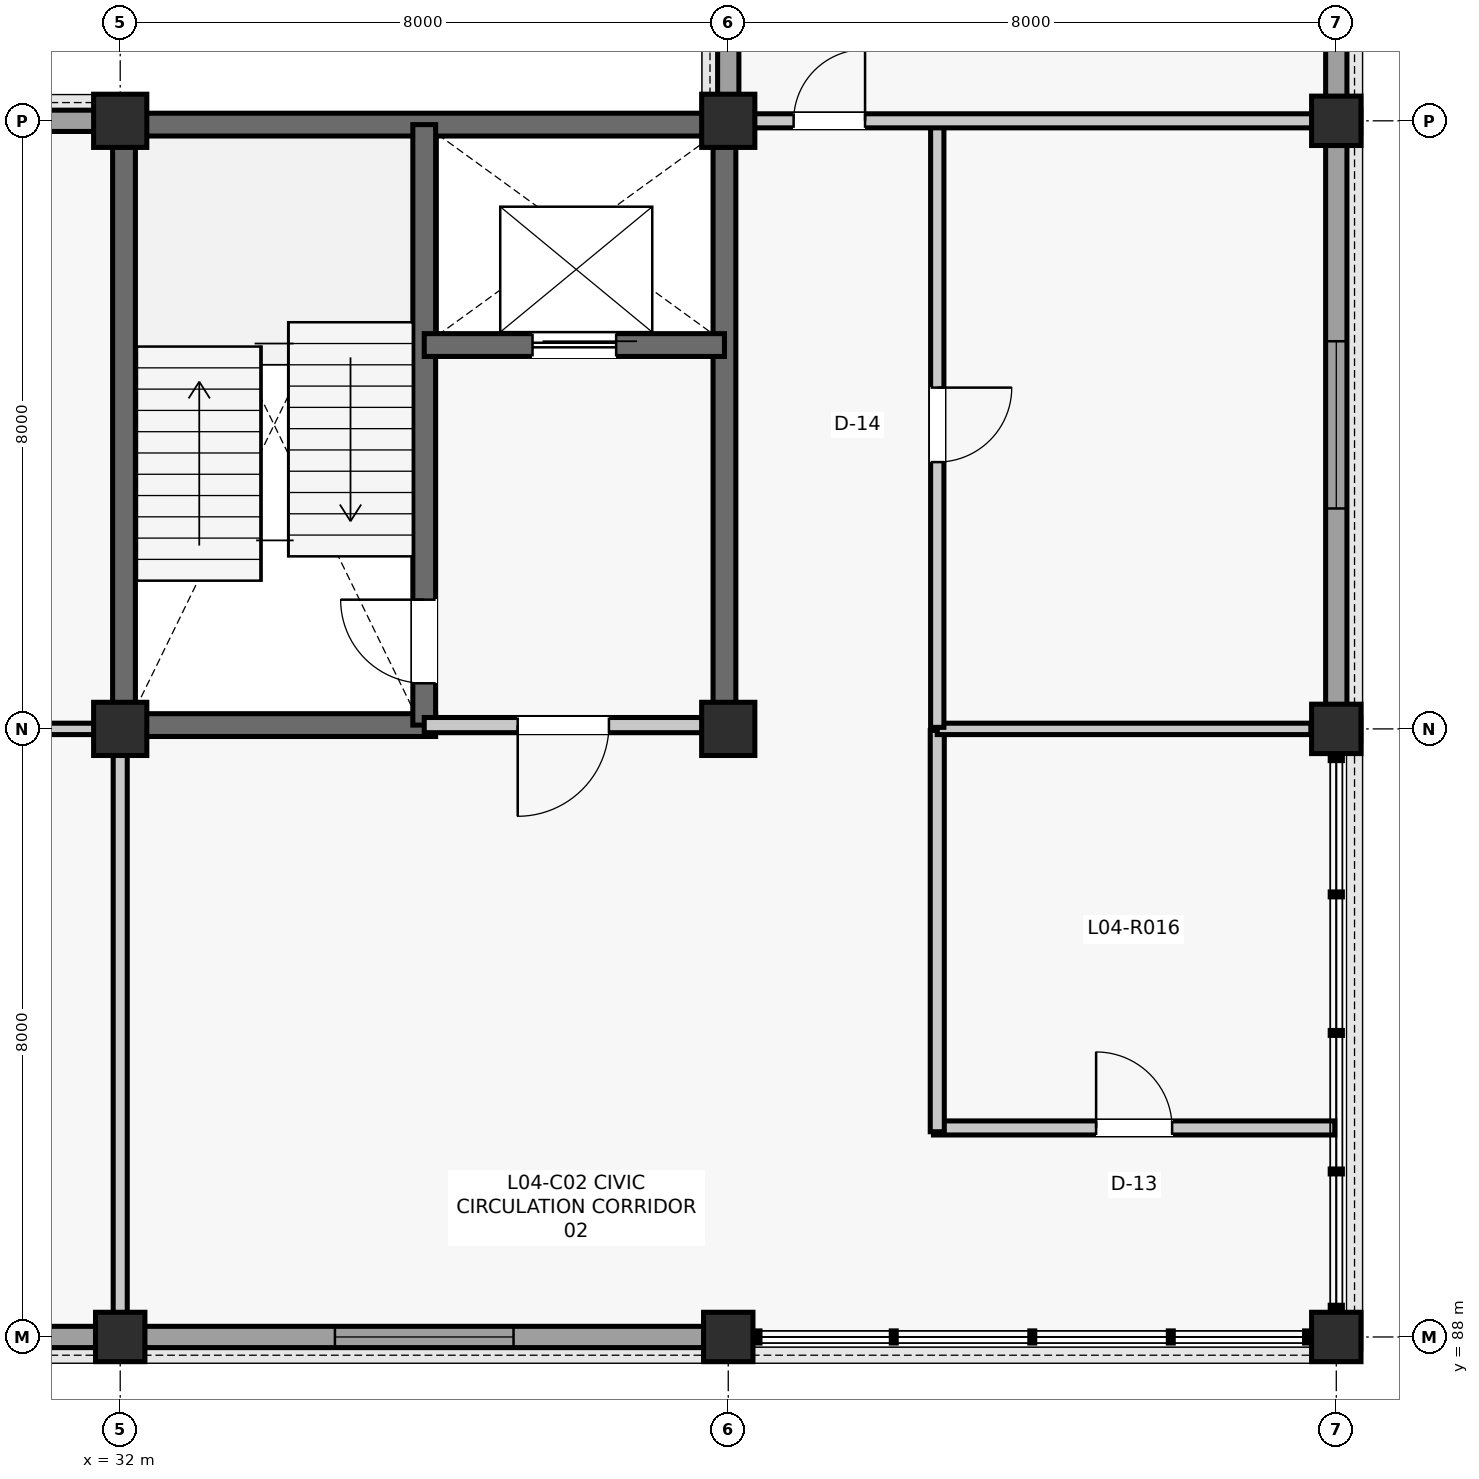
"""IFC4 building model, lengths in metres.
Left out: names, types, materials, properties, quantities, classifications, styles, units other than length and angle.
Written with IfcOpenShell. Run it as: python <this file> out.ifc"""

import sys

from ifc_helpers import new_model, si_unit, direction, frame, frame_2d, origin, origin_2d, place, context, subcontext, project, spatial, rectangle, extrude, element, fill, save


model = new_model("IFC4")
c1 = context("Model", 3, precision=1e-05, world=origin(), true_north=direction((0.0, 1.0)))
c2 = subcontext(c1, "Body", "Model", "MODEL_VIEW")
j1 = project(units=[si_unit("LENGTHUNIT", "METRE"), si_unit("PLANEANGLEUNIT", "RADIAN")], contexts=[c1])
p1 = place(None, origin())
s1 = spatial("IfcSite", under=j1, at=p1, CompositionType="ELEMENT")
p2 = place(p1, origin())
s2 = spatial("IfcBuilding", under=s1, at=p2, CompositionType="ELEMENT")
p3 = place(p2, frame((0.0, 0.0, 17.82)))
s3 = spatial("IfcBuildingStorey", under=s2, at=p3, CompositionType="ELEMENT", Elevation=17.82)
p4 = place(p3, frame((32.0, 88.0, 0.0), z_axis=(0.0, 0.0, 1.0), x_axis=(1.0, 0.0, 0.0)))
e1 = element("IfcColumn", 1, at=p4, inside=s3, PredefinedType="COLUMN", context=c2, shape_type="SweptSolid", body=[
    extrude(rectangle(XDim=0.65, YDim=0.65, at=origin_2d()), origin(), (0.0, 0.0, 1.0), 3.96),
])
for number, where, z_axis, x_axis in (
    (2, (32.0, 96.0, 0.0), (0.0, 0.0, 1.0), (1.0, 0.0, 0.0)),
    (3, (32.0, 104.0, 0.0), (0.0, 0.0, 1.0), (1.0, 0.0, 0.0)),
):
    element("IfcColumn", number, at=place(p3, frame(where, z_axis=z_axis, x_axis=x_axis)), inside=s3, PredefinedType="COLUMN", context=c2, shape_type="SweptSolid", body=[
        extrude(rectangle(XDim=0.7, YDim=0.7, at=origin_2d()), origin(), (0.0, 0.0, 1.0), 3.96),
    ])
p5 = place(p3, frame((40.0, 88.0, 0.0), z_axis=(0.0, 0.0, 1.0), x_axis=(1.0, 0.0, 0.0)))
e4 = element("IfcColumn", 4, at=p5, inside=s3, PredefinedType="COLUMN", context=c2, shape_type="SweptSolid", body=[
    extrude(rectangle(XDim=0.65, YDim=0.65, at=origin_2d()), origin(), (0.0, 0.0, 1.0), 3.96),
])
for number, where, z_axis, x_axis in (
    (5, (40.0, 96.0, 0.0), (0.0, 0.0, 1.0), (1.0, 0.0, 0.0)),
    (6, (40.0, 104.0, 0.0), (0.0, 0.0, 1.0), (1.0, 0.0, 0.0)),
):
    element("IfcColumn", number, at=place(p3, frame(where, z_axis=z_axis, x_axis=x_axis)), inside=s3, PredefinedType="COLUMN", context=c2, shape_type="SweptSolid", body=[
        extrude(rectangle(XDim=0.7, YDim=0.7, at=origin_2d()), origin(), (0.0, 0.0, 1.0), 3.96),
    ])
for number, where, z_axis, x_axis in (
    (7, (48.0, 88.0, 0.0), (0.0, 0.0, 1.0), (1.0, 0.0, 0.0)),
    (8, (48.0, 96.0, 0.0), (0.0, 0.0, 1.0), (1.0, 0.0, 0.0)),
    (9, (48.0, 104.0, 0.0), (0.0, 0.0, 1.0), (1.0, 0.0, 0.0)),
):
    element("IfcColumn", number, at=place(p3, frame(where, z_axis=z_axis, x_axis=x_axis)), inside=s3, PredefinedType="COLUMN", context=c2, shape_type="SweptSolid", body=[
        extrude(rectangle(XDim=0.65, YDim=0.65, at=origin_2d()), origin(), (0.0, 0.0, 1.0), 3.96),
    ])
p6 = place(p3, frame((24.31, 88.0, 0.0), z_axis=(0.0, 0.0, 1.0), x_axis=(1.0, 0.0, 0.0)))
e10 = element("IfcWall", 10, at=p6, inside=s3, PredefinedType="SOLIDWALL", context=c2, shape_type="SweptSolid", body=[
    extrude(rectangle(XDim=7.38, YDim=0.28, at=frame_2d((3.69, 0.0))), origin(), (0.0, 0.0, 1.0), 3.314),
])
p7 = place(p6, frame((2.865, 0.0, 0.9)))
e11 = element("IfcOpeningElement", 11, at=p7, cuts=e10, PredefinedType="OPENING", context=c2, shape_type="SweptSolid", body=[
    extrude(rectangle(XDim=1.65, YDim=1.75, at=frame_2d((0.825, 0.875))), frame((0.0, 0.15, 0.0), z_axis=(0.0, -1.0, 0.0), x_axis=(1.0, 0.0, 0.0)), (0.0, 0.0, 1.0), 0.3),
])
p8 = place(p3, frame((24.31, 104.0, 0.0), z_axis=(0.0, 0.0, 1.0), x_axis=(1.0, 0.0, 0.0)))
e12 = element("IfcWall", 12, at=p8, inside=s3, PredefinedType="SOLIDWALL", context=c2, shape_type="SweptSolid", body=[
    extrude(rectangle(XDim=7.355, YDim=0.28, at=frame_2d((3.677, 0.0))), origin(), (0.0, 0.0, 1.0), 3.31),
])
p9 = place(p8, frame((2.502, 0.0, 0.9)))
e13 = element("IfcOpeningElement", 13, at=p9, cuts=e12, PredefinedType="OPENING", context=c2, shape_type="SweptSolid", body=[
    extrude(rectangle(XDim=2.35, YDim=1.7, at=frame_2d((1.175, 0.85))), frame((0.0, 0.15, 0.0), z_axis=(0.0, -1.0, 0.0), x_axis=(1.0, 0.0, 0.0)), (0.0, 0.0, 1.0), 0.3),
])
p10 = place(p3, frame((32.31, 88.0, 0.0), z_axis=(0.0, 0.0, 1.0), x_axis=(1.0, 0.0, 0.0)))
e14 = element("IfcWall", 14, at=p10, inside=s3, PredefinedType="SOLIDWALL", context=c2, shape_type="SweptSolid", body=[
    extrude(rectangle(XDim=7.38, YDim=0.28, at=frame_2d((3.69, 0.0))), origin(), (0.0, 0.0, 1.0), 3.377),
])
p11 = place(p10, frame((2.515, 0.0, 0.9)))
e15 = element("IfcOpeningElement", 15, at=p11, cuts=e14, PredefinedType="OPENING", context=c2, shape_type="SweptSolid", body=[
    extrude(rectangle(XDim=2.35, YDim=1.7, at=frame_2d((1.175, 0.85))), frame((0.0, 0.15, 0.0), z_axis=(0.0, -1.0, 0.0), x_axis=(1.0, 0.0, 0.0)), (0.0, 0.0, 1.0), 0.3),
])
p12 = place(p3, frame((48.0, 96.31, 0.0), z_axis=(0.0, 0.0, 1.0), x_axis=(0.0, 1.0, 0.0)))
e16 = element("IfcWall", 16, at=p12, inside=s3, PredefinedType="SOLIDWALL", context=c2, shape_type="SweptSolid", body=[
    extrude(rectangle(XDim=7.38, YDim=0.28, at=frame_2d((3.69, 0.0))), origin(), (0.0, 0.0, 1.0), 3.314),
])
p13 = place(p12, frame((2.59, 0.0, 0.9)))
e17 = element("IfcOpeningElement", 17, at=p13, cuts=e16, PredefinedType="OPENING", context=c2, shape_type="SweptSolid", body=[
    extrude(rectangle(XDim=2.2, YDim=2.0, at=frame_2d((1.1, 1.0))), frame((0.0, 0.15, 0.0), z_axis=(0.0, -1.0, 0.0), x_axis=(1.0, 0.0, 0.0)), (0.0, 0.0, 1.0), 0.3),
])
p14 = place(p3, frame((40.0, 104.335, 0.0), z_axis=(0.0, 0.0, 1.0), x_axis=(0.0, 1.0, 0.0)))
e18 = element("IfcWall", 18, at=p14, inside=s3, PredefinedType="SOLIDWALL", context=c2, shape_type="SweptSolid", body=[
    extrude(rectangle(XDim=7.355, YDim=0.28, at=frame_2d((3.677, 0.0))), origin(), (0.0, 0.0, 1.0), 3.314),
])
p15 = place(p14, frame((2.853, 0.0, 0.9)))
e19 = element("IfcOpeningElement", 19, at=p15, cuts=e18, PredefinedType="OPENING", context=c2, shape_type="SweptSolid", body=[
    extrude(rectangle(XDim=1.65, YDim=1.75, at=frame_2d((0.825, 0.875))), frame((0.0, 0.15, 0.0), z_axis=(0.0, -1.0, 0.0), x_axis=(1.0, 0.0, 0.0)), (0.0, 0.0, 1.0), 0.3),
])
p16 = place(p3, frame((48.0, 104.31, 0.0), z_axis=(0.0, 0.0, 1.0), x_axis=(0.0, 1.0, 0.0)))
e20 = element("IfcWall", 20, at=p16, inside=s3, PredefinedType="SOLIDWALL", context=c2, shape_type="SweptSolid", body=[
    extrude(rectangle(XDim=7.38, YDim=0.28, at=frame_2d((3.69, 0.0))), origin(), (0.0, 0.0, 1.0), 3.377),
])
p17 = place(p16, frame((2.865, 0.0, 0.9)))
e21 = element("IfcOpeningElement", 21, at=p17, cuts=e20, PredefinedType="OPENING", context=c2, shape_type="SweptSolid", body=[
    extrude(rectangle(XDim=1.65, YDim=1.75, at=frame_2d((0.825, 0.875))), frame((0.0, 0.15, 0.0), z_axis=(0.0, -1.0, 0.0), x_axis=(1.0, 0.0, 0.0)), (0.0, 0.0, 1.0), 0.3),
])
p18 = place(p3, frame((32.05, 96.24, 0.0), z_axis=(0.0, 0.0, 1.0), x_axis=(0.0, 1.0, 0.0)))
e22 = element("IfcWall", 22, at=p18, inside=s3, PredefinedType="SHEAR", context=c2, shape_type="SweptSolid", body=[
    extrude(rectangle(XDim=7.52, YDim=0.3, at=frame_2d((3.76, 0.0))), origin(), (0.0, 0.0, 1.0), 3.263),
])
p19 = place(p3, frame((32.24, 103.95, 0.0), z_axis=(0.0, 0.0, 1.0), x_axis=(1.0, 0.0, 0.0)))
e23 = element("IfcWall", 23, at=p19, inside=s3, PredefinedType="SHEAR", context=c2, shape_type="SweptSolid", body=[
    extrude(rectangle(XDim=7.52, YDim=0.3, at=frame_2d((3.76, 0.0))), origin(), (0.0, 0.0, 1.0), 3.367),
])
p20 = place(p3, frame((39.95, 96.24, 0.0), z_axis=(0.0, 0.0, 1.0), x_axis=(0.0, 1.0, 0.0)))
e24 = element("IfcWall", 24, at=p20, inside=s3, PredefinedType="SHEAR", context=c2, shape_type="SweptSolid", body=[
    extrude(rectangle(XDim=7.52, YDim=0.3, at=frame_2d((3.76, 0.0))), origin(), (0.0, 0.0, 1.0), 3.462),
])
p21 = place(p3, frame((32.24, 96.05, 0.0), z_axis=(0.0, 0.0, 1.0), x_axis=(1.0, 0.0, 0.0)))
e25 = element("IfcWall", 25, at=p21, inside=s3, PredefinedType="SHEAR", context=c2, shape_type="SweptSolid", body=[
    extrude(rectangle(XDim=3.91, YDim=0.3, at=frame_2d((1.955, 0.0))), origin(), (0.0, 0.0, 1.0), 3.257),
])
p22 = place(p3, frame((36.0, 96.05, 0.0), z_axis=(0.0, 0.0, 1.0), x_axis=(0.0, 1.0, 0.0)))
e26 = element("IfcWall", 26, at=p22, inside=s3, PredefinedType="SHEAR", context=c2, shape_type="SweptSolid", body=[
    extrude(rectangle(XDim=7.9, YDim=0.3, at=frame_2d((3.95, 0.0))), origin(), (0.0, 0.0, 1.0), 3.257),
])
p23 = place(p22, frame((0.55, 0.0, 0.0)))
e27 = element("IfcOpeningElement", 27, at=p23, cuts=e26, PredefinedType="OPENING", context=c2, shape_type="SweptSolid", body=[
    extrude(rectangle(XDim=1.1, YDim=2.15, at=frame_2d((0.55, 1.075))), frame((0.0, 0.16, 0.0), z_axis=(0.0, -1.0, 0.0), x_axis=(1.0, 0.0, 0.0)), (0.0, 0.0, 1.0), 0.32),
])
p24 = place(p3, frame((36.0, 101.05, 0.0), z_axis=(0.0, 0.0, 1.0), x_axis=(1.0, 0.0, 0.0)))
e28 = element("IfcWall", 28, at=p24, inside=s3, PredefinedType="SHEAR", context=c2, shape_type="SweptSolid", body=[
    extrude(rectangle(XDim=3.95, YDim=0.3, at=frame_2d((1.975, 0.0))), origin(), (0.0, 0.0, 1.0), 3.735),
])
p25 = place(p24, frame((1.425, 0.0, 0.0)))
e29 = element("IfcOpeningElement", 29, at=p25, cuts=e28, PredefinedType="OPENING", context=c2, shape_type="SweptSolid", body=[
    extrude(rectangle(XDim=1.1, YDim=2.2, at=frame_2d((0.55, 1.1))), frame((0.0, 0.16, 0.0), z_axis=(0.0, -1.0, 0.0), x_axis=(1.0, 0.0, 0.0)), (0.0, 0.0, 1.0), 0.32),
])
p26 = place(p3, frame((36.0, 96.05, 0.0), z_axis=(0.0, 0.0, 1.0), x_axis=(1.0, 0.0, 0.0)))
e30 = element("IfcWall", 30, at=p26, inside=s3, PredefinedType="PARTITIONING", context=c2, shape_type="SweptSolid", body=[
    extrude(rectangle(XDim=3.66, YDim=0.2, at=frame_2d((1.83, 0.0))), origin(), (0.0, 0.0, 1.0), 3.257),
])
p27 = place(p26, frame((1.23, 0.0, 0.0)))
e31 = element("IfcOpeningElement", 31, at=p27, cuts=e30, PredefinedType="OPENING", context=c2, shape_type="SweptSolid", body=[
    extrude(rectangle(XDim=1.2, YDim=2.15, at=frame_2d((0.6, 1.075))), frame((0.0, 0.11, 0.0), z_axis=(0.0, -1.0, 0.0), x_axis=(1.0, 0.0, 0.0)), (0.0, 0.0, 1.0), 0.22),
])
p28 = place(p3, frame((42.7, 90.75, 0.0), z_axis=(0.0, 0.0, 1.0), x_axis=(1.0, 0.0, 0.0)))
e32 = element("IfcWall", 32, at=p28, inside=s3, PredefinedType="PARTITIONING", context=c2, shape_type="SweptSolid", body=[
    extrude(rectangle(XDim=5.28, YDim=0.185, at=frame_2d((2.64, 0.0))), origin(), (0.0, 0.0, 1.0), 3.367),
])
p29 = place(p28, frame((2.14, 0.0, 0.0)))
e33 = element("IfcOpeningElement", 33, at=p29, cuts=e32, PredefinedType="OPENING", context=c2, shape_type="SweptSolid", body=[
    extrude(rectangle(XDim=1.0, YDim=2.15, at=frame_2d((0.5, 1.075))), frame((0.0, 0.103, 0.0), z_axis=(0.0, -1.0, 0.0), x_axis=(1.0, 0.0, 0.0)), (0.0, 0.0, 1.0), 0.205),
])
p30 = place(p3, frame((42.75, 90.7, 0.0), z_axis=(0.0, 0.0, 1.0), x_axis=(0.0, 1.0, 0.0)))
e34 = element("IfcWall", 34, at=p30, inside=s3, PredefinedType="PARTITIONING", context=c2, shape_type="SweptSolid", body=[
    extrude(rectangle(XDim=5.28, YDim=0.185, at=frame_2d((2.64, 0.0))), origin(), (0.0, 0.0, 1.0), 3.263),
])
p31 = place(p3, frame((42.75, 96.0, 0.0), z_axis=(0.0, 0.0, 1.0), x_axis=(1.0, 0.0, 0.0)))
e35 = element("IfcWall", 35, at=p31, inside=s3, PredefinedType="PARTITIONING", context=c2, shape_type="SweptSolid", body=[
    extrude(rectangle(XDim=4.915, YDim=0.15, at=frame_2d((2.458, 0.0))), origin(), (0.0, 0.0, 1.0), 3.263),
])
p32 = place(p3, frame((42.75, 96.02, 0.0), z_axis=(0.0, 0.0, 1.0), x_axis=(0.0, 1.0, 0.0)))
e36 = element("IfcWall", 36, at=p32, inside=s3, PredefinedType="PARTITIONING", context=c2, shape_type="SweptSolid", body=[
    extrude(rectangle(XDim=7.96, YDim=0.175, at=frame_2d((3.98, 0.0))), origin(), (0.0, 0.0, 1.0), 3.251),
])
p33 = place(p32, frame((3.49, 0.0, 0.0)))
e37 = element("IfcOpeningElement", 37, at=p33, cuts=e36, PredefinedType="OPENING", context=c2, shape_type="SweptSolid", body=[
    extrude(rectangle(XDim=0.98, YDim=2.15, at=frame_2d((0.49, 1.075))), frame((0.0, 0.097, 0.0), z_axis=(0.0, -1.0, 0.0), x_axis=(1.0, 0.0, 0.0)), (0.0, 0.0, 1.0), 0.195),
])
p34 = place(p3, frame((32.0, 88.315, 0.0), z_axis=(0.0, 0.0, 1.0), x_axis=(0.0, 1.0, 0.0)))
e38 = element("IfcWall", 38, at=p34, inside=s3, PredefinedType="PARTITIONING", context=c2, shape_type="SweptSolid", body=[
    extrude(rectangle(XDim=7.345, YDim=0.185, at=frame_2d((3.672, 0.0))), origin(), (0.0, 0.0, 1.0), 3.257),
])
p35 = place(p3, frame((24.315, 96.0, 0.0), z_axis=(0.0, 0.0, 1.0), x_axis=(1.0, 0.0, 0.0)))
e39 = element("IfcWall", 39, at=p35, inside=s3, PredefinedType="PARTITIONING", context=c2, shape_type="SweptSolid", body=[
    extrude(rectangle(XDim=7.345, YDim=0.15, at=frame_2d((3.672, 0.0))), origin(), (0.0, 0.0, 1.0), 3.462),
])
p36 = place(p3, frame((40.34, 104.0, 0.0), z_axis=(0.0, 0.0, 1.0), x_axis=(1.0, 0.0, 0.0)))
e40 = element("IfcWall", 40, at=p36, inside=s3, PredefinedType="PARTITIONING", context=c2, shape_type="SweptSolid", body=[
    extrude(rectangle(XDim=7.345, YDim=0.185, at=frame_2d((3.672, 0.0))), origin(), (0.0, 0.0, 1.0), 3.251),
])
p37 = place(p36, frame((0.52, 0.0, 0.0)))
e41 = element("IfcOpeningElement", 41, at=p37, cuts=e40, PredefinedType="OPENING", context=c2, shape_type="SweptSolid", body=[
    extrude(rectangle(XDim=0.94, YDim=2.12, at=frame_2d((0.47, 1.06))), frame((0.0, 0.103, 0.0), z_axis=(0.0, -1.0, 0.0), x_axis=(1.0, 0.0, 0.0)), (0.0, 0.0, 1.0), 0.205),
])
p38 = place(p11, origin())
e42 = element("IfcWindow", 42, at=p38, inside=s3, PartitioningType="SINGLE_PANEL", PredefinedType="WINDOW", context=c2, shape_type="SweptSolid", body=[
    extrude(rectangle(XDim=2.35, YDim=1.7, at=frame_2d((1.175, 0.85))), frame((0.0, 0.03, 0.0), z_axis=(0.0, -1.0, 0.0), x_axis=(1.0, 0.0, 0.0)), (0.0, 0.0, 1.0), 0.06),
])
fill(e15, e42)
p39 = place(p13, origin())
e43 = element("IfcWindow", 43, at=p39, inside=s3, PartitioningType="SINGLE_PANEL", PredefinedType="WINDOW", context=c2, shape_type="SweptSolid", body=[
    extrude(rectangle(XDim=2.2, YDim=2.0, at=frame_2d((1.1, 1.0))), frame((0.0, 0.03, 0.0), z_axis=(0.0, -1.0, 0.0), x_axis=(1.0, 0.0, 0.0)), (0.0, 0.0, 1.0), 0.06),
])
fill(e17, e43)
p40 = place(p23, origin())
e44 = element("IfcDoor", 44, at=p40, inside=s3, OperationType="SINGLE_SWING_RIGHT", PredefinedType="DOOR", context=c2, shape_type="SweptSolid", body=[
    extrude(rectangle(XDim=1.1, YDim=2.15, at=frame_2d((0.55, 1.075))), frame((0.0, 0.025, 0.0), z_axis=(0.0, -1.0, 0.0), x_axis=(1.0, 0.0, 0.0)), (0.0, 0.0, 1.0), 0.05),
])
fill(e27, e44)
p41 = place(p25, origin())
e45 = element("IfcDoor", 45, at=p41, inside=s3, OperationType="SLIDING_TO_LEFT", PredefinedType="DOOR", context=c2, shape_type="SweptSolid", body=[
    extrude(rectangle(XDim=1.1, YDim=2.2, at=frame_2d((0.55, 1.1))), frame((0.0, 0.025, 0.0), z_axis=(0.0, -1.0, 0.0), x_axis=(1.0, 0.0, 0.0)), (0.0, 0.0, 1.0), 0.05),
])
fill(e29, e45)
p42 = place(p27, frame((1.2, 0.0, 0.0), z_axis=(0.0, 0.0, 1.0), x_axis=(-1.0, 0.0, 0.0)))
e46 = element("IfcDoor", 46, at=p42, inside=s3, OperationType="SINGLE_SWING_LEFT", PredefinedType="DOOR", context=c2, shape_type="SweptSolid", body=[
    extrude(rectangle(XDim=1.2, YDim=2.15, at=frame_2d((0.6, 1.075))), frame((0.0, 0.025, 0.0), z_axis=(0.0, -1.0, 0.0), x_axis=(1.0, 0.0, 0.0)), (0.0, 0.0, 1.0), 0.05),
])
fill(e31, e46)
p43 = place(p29, origin())
e47 = element("IfcDoor", 47, at=p43, inside=s3, OperationType="SINGLE_SWING_LEFT", PredefinedType="DOOR", context=c2, shape_type="SweptSolid", body=[
    extrude(rectangle(XDim=1.0, YDim=2.15, at=frame_2d((0.5, 1.075))), frame((0.0, 0.025, 0.0), z_axis=(0.0, -1.0, 0.0), x_axis=(1.0, 0.0, 0.0)), (0.0, 0.0, 1.0), 0.05),
])
fill(e33, e47)
p44 = place(p33, frame((0.98, 0.0, 0.0), z_axis=(0.0, 0.0, 1.0), x_axis=(-1.0, 0.0, 0.0)))
e48 = element("IfcDoor", 48, at=p44, inside=s3, OperationType="SINGLE_SWING_RIGHT", PredefinedType="DOOR", context=c2, shape_type="SweptSolid", body=[
    extrude(rectangle(XDim=0.98, YDim=2.15, at=frame_2d((0.49, 1.075))), frame((0.0, 0.025, 0.0), z_axis=(0.0, -1.0, 0.0), x_axis=(1.0, 0.0, 0.0)), (0.0, 0.0, 1.0), 0.05),
])
fill(e37, e48)
p45 = place(p37, origin())
e49 = element("IfcDoor", 49, at=p45, inside=s3, OperationType="SINGLE_SWING_RIGHT", PredefinedType="DOOR", context=c2, shape_type="SweptSolid", body=[
    extrude(rectangle(XDim=0.94, YDim=2.12, at=frame_2d((0.47, 1.06))), frame((0.0, 0.025, 0.0), z_axis=(0.0, -1.0, 0.0), x_axis=(1.0, 0.0, 0.0)), (0.0, 0.0, 1.0), 0.05),
])
fill(e41, e49)
save(model, sys.argv[1])
